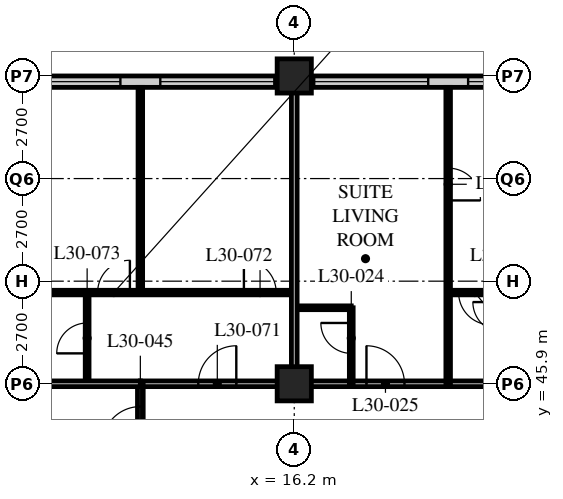
"""IFC4 building model, lengths in metres.
Left out: names, types, materials, properties, quantities, classifications, styles, units other than length and angle.
Written with IfcOpenShell. Run it as: python <this file> out.ifc"""

import sys

from ifc_helpers import new_model, si_unit, direction, frame, frame_2d, origin, origin_2d, place, context, subcontext, project, spatial, rectangle, hollow_rectangle, extrude, element, fill, save


model = new_model("IFC4")
c1 = context("Model", 3, precision=1e-05, world=origin(), true_north=direction((0.0, 1.0)))
c2 = subcontext(c1, "Body", "Model", "MODEL_VIEW")
j1 = project(units=[si_unit("LENGTHUNIT", "METRE"), si_unit("PLANEANGLEUNIT", "RADIAN")], contexts=[c1])
p1 = place(None, origin())
s1 = spatial("IfcSite", under=j1, at=p1, CompositionType="ELEMENT")
p2 = place(p1, origin())
s2 = spatial("IfcBuilding", under=s1, at=p2, CompositionType="ELEMENT")
p3 = place(p2, frame((0.0, 0.0, 120.4)))
s3 = spatial("IfcBuildingStorey", under=s2, at=p3, CompositionType="ELEMENT", Elevation=120.4)
for number, where, z_axis, x_axis in (
    (1, (16.2, 45.9, 0.0), (0.0, 0.0, 1.0), (1.0, 0.0, 0.0)),
    (2, (16.2, 54.0, 0.0), (0.0, 0.0, 1.0), (1.0, 0.0, 0.0)),
):
    element("IfcColumn", number, at=place(p3, frame(where, z_axis=z_axis, x_axis=x_axis)), inside=s3, PredefinedType="COLUMN", context=c2, shape_type="SweptSolid", body=[
        extrude(hollow_rectangle(XDim=0.9, YDim=0.9, WallThickness=0.09, at=origin_2d()), origin(), (0.0, 0.0, 1.0), 3.4),
    ])
p4 = place(p3, frame((48.3, 53.85, 0.0), z_axis=(0.0, 0.0, 1.0), x_axis=(-1.0, 0.0, 0.0)))
e3 = element("IfcWall", 3, at=p4, inside=s3, PredefinedType="SOLIDWALL", context=c2, shape_type="SweptSolid", body=[
    extrude(rectangle(XDim=40.2, YDim=0.3, at=frame_2d((20.1, 0.0))), origin(), (0.0, 0.0, 1.0), 3.19),
])
p5 = place(p4, frame((0.225, 0.0, 0.9)))
e4 = element("IfcOpeningElement", 4, at=p5, cuts=e3, PredefinedType="OPENING", context=c2, shape_type="SweptSolid", body=[
    extrude(rectangle(XDim=3.0, YDim=2.0, at=frame_2d((1.5, 1.0))), frame((0.0, 0.16, 0.0), z_axis=(0.0, -1.0, 0.0), x_axis=(1.0, 0.0, 0.0)), (0.0, 0.0, 1.0), 0.32),
])
p6 = place(p4, frame((4.275, 0.0, 0.9)))
e5 = element("IfcOpeningElement", 5, at=p6, cuts=e3, PredefinedType="OPENING", context=c2, shape_type="SweptSolid", body=[
    extrude(rectangle(XDim=3.0, YDim=2.0, at=frame_2d((1.5, 1.0))), frame((0.0, 0.16, 0.0), z_axis=(0.0, -1.0, 0.0), x_axis=(1.0, 0.0, 0.0)), (0.0, 0.0, 1.0), 0.32),
])
p7 = place(p4, frame((8.325, 0.0, 0.9)))
e6 = element("IfcOpeningElement", 6, at=p7, cuts=e3, PredefinedType="OPENING", context=c2, shape_type="SweptSolid", body=[
    extrude(rectangle(XDim=3.0, YDim=2.0, at=frame_2d((1.5, 1.0))), frame((0.0, 0.16, 0.0), z_axis=(0.0, -1.0, 0.0), x_axis=(1.0, 0.0, 0.0)), (0.0, 0.0, 1.0), 0.32),
])
p8 = place(p4, frame((12.375, 0.0, 0.9)))
e7 = element("IfcOpeningElement", 7, at=p8, cuts=e3, PredefinedType="OPENING", context=c2, shape_type="SweptSolid", body=[
    extrude(rectangle(XDim=3.0, YDim=2.0, at=frame_2d((1.5, 1.0))), frame((0.0, 0.16, 0.0), z_axis=(0.0, -1.0, 0.0), x_axis=(1.0, 0.0, 0.0)), (0.0, 0.0, 1.0), 0.32),
])
p9 = place(p4, frame((16.425, 0.0, 0.9)))
e8 = element("IfcOpeningElement", 8, at=p9, cuts=e3, PredefinedType="OPENING", context=c2, shape_type="SweptSolid", body=[
    extrude(rectangle(XDim=3.0, YDim=2.0, at=frame_2d((1.5, 1.0))), frame((0.0, 0.16, 0.0), z_axis=(0.0, -1.0, 0.0), x_axis=(1.0, 0.0, 0.0)), (0.0, 0.0, 1.0), 0.32),
])
p10 = place(p4, frame((20.475, 0.0, 0.9)))
e9 = element("IfcOpeningElement", 9, at=p10, cuts=e3, PredefinedType="OPENING", context=c2, shape_type="SweptSolid", body=[
    extrude(rectangle(XDim=3.0, YDim=2.0, at=frame_2d((1.5, 1.0))), frame((0.0, 0.16, 0.0), z_axis=(0.0, -1.0, 0.0), x_axis=(1.0, 0.0, 0.0)), (0.0, 0.0, 1.0), 0.32),
])
p11 = place(p4, frame((24.525, 0.0, 0.9)))
e10 = element("IfcOpeningElement", 10, at=p11, cuts=e3, PredefinedType="OPENING", context=c2, shape_type="SweptSolid", body=[
    extrude(rectangle(XDim=3.0, YDim=2.0, at=frame_2d((1.5, 1.0))), frame((0.0, 0.16, 0.0), z_axis=(0.0, -1.0, 0.0), x_axis=(1.0, 0.0, 0.0)), (0.0, 0.0, 1.0), 0.32),
])
p12 = place(p4, frame((28.575, 0.0, 0.9)))
e11 = element("IfcOpeningElement", 11, at=p12, cuts=e3, PredefinedType="OPENING", context=c2, shape_type="SweptSolid", body=[
    extrude(rectangle(XDim=3.0, YDim=2.0, at=frame_2d((1.5, 1.0))), frame((0.0, 0.16, 0.0), z_axis=(0.0, -1.0, 0.0), x_axis=(1.0, 0.0, 0.0)), (0.0, 0.0, 1.0), 0.32),
])
p13 = place(p4, frame((32.625, 0.0, 0.9)))
e12 = element("IfcOpeningElement", 12, at=p13, cuts=e3, PredefinedType="OPENING", context=c2, shape_type="SweptSolid", body=[
    extrude(rectangle(XDim=3.0, YDim=2.0, at=frame_2d((1.5, 1.0))), frame((0.0, 0.16, 0.0), z_axis=(0.0, -1.0, 0.0), x_axis=(1.0, 0.0, 0.0)), (0.0, 0.0, 1.0), 0.32),
])
p14 = place(p4, frame((36.675, 0.0, 0.9)))
e13 = element("IfcOpeningElement", 13, at=p14, cuts=e3, PredefinedType="OPENING", context=c2, shape_type="SweptSolid", body=[
    extrude(rectangle(XDim=3.0, YDim=2.0, at=frame_2d((1.5, 1.0))), frame((0.0, 0.16, 0.0), z_axis=(0.0, -1.0, 0.0), x_axis=(1.0, 0.0, 0.0)), (0.0, 0.0, 1.0), 0.32),
])
p15 = place(p3, frame((12.15, 45.9, 0.0), z_axis=(0.0, 0.0, 1.0), x_axis=(1.0, 0.0, 0.0)))
e14 = element("IfcWall", 14, at=p15, inside=s3, PredefinedType="PARTITIONING", context=c2, shape_type="SweptSolid", body=[
    extrude(rectangle(XDim=32.4, YDim=0.15, at=frame_2d((16.2, 0.0))), origin(), (0.0, 0.0, 1.0), 2.578),
])
p16 = place(p15, frame((5.95, 0.0, 0.0)))
e15 = element("IfcOpeningElement", 15, at=p16, cuts=e14, PredefinedType="OPENING", context=c2, shape_type="SweptSolid", body=[
    extrude(rectangle(XDim=1.0, YDim=2.1, at=frame_2d((0.5, 1.05))), frame((0.0, 0.085, 0.0), z_axis=(0.0, -1.0, 0.0), x_axis=(1.0, 0.0, 0.0)), (0.0, 0.0, 1.0), 0.17),
])
p17 = place(p15, frame((14.05, 0.0, 0.0)))
e16 = element("IfcOpeningElement", 16, at=p17, cuts=e14, PredefinedType="OPENING", context=c2, shape_type="SweptSolid", body=[
    extrude(rectangle(XDim=1.0, YDim=2.1, at=frame_2d((0.5, 1.05))), frame((0.0, 0.085, 0.0), z_axis=(0.0, -1.0, 0.0), x_axis=(1.0, 0.0, 0.0)), (0.0, 0.0, 1.0), 0.17),
])
p18 = place(p15, frame((25.7, 0.0, 0.0)))
e17 = element("IfcOpeningElement", 17, at=p18, cuts=e14, PredefinedType="OPENING", context=c2, shape_type="SweptSolid", body=[
    extrude(rectangle(XDim=1.0, YDim=2.1, at=frame_2d((0.5, 1.05))), frame((0.0, 0.085, 0.0), z_axis=(0.0, -1.0, 0.0), x_axis=(1.0, 0.0, 0.0)), (0.0, 0.0, 1.0), 0.17),
])
p19 = place(p15, frame((29.875, 0.0, 0.0)))
e18 = element("IfcOpeningElement", 18, at=p19, cuts=e14, PredefinedType="OPENING", context=c2, shape_type="SweptSolid", body=[
    extrude(rectangle(XDim=1.0, YDim=2.1, at=frame_2d((0.5, 1.05))), frame((0.0, 0.085, 0.0), z_axis=(0.0, -1.0, 0.0), x_axis=(1.0, 0.0, 0.0)), (0.0, 0.0, 1.0), 0.17),
])
p20 = place(p15, frame((1.525, 0.0, 0.0)))
e19 = element("IfcOpeningElement", 19, at=p20, cuts=e14, PredefinedType="OPENING", context=c2, shape_type="SweptSolid", body=[
    extrude(rectangle(XDim=1.0, YDim=2.1, at=frame_2d((0.5, 1.05))), frame((0.0, 0.085, 0.0), z_axis=(0.0, -1.0, 0.0), x_axis=(1.0, 0.0, 0.0)), (0.0, 0.0, 1.0), 0.17),
])
p21 = place(p3, frame((12.15, 17.55, 0.0), z_axis=(0.0, 0.0, 1.0), x_axis=(0.0, 1.0, 0.0)))
e20 = element("IfcWall", 20, at=p21, inside=s3, PredefinedType="PARTITIONING", context=c2, shape_type="SweptSolid", body=[
    extrude(rectangle(XDim=28.35, YDim=0.15, at=frame_2d((14.175, 0.0))), origin(), (0.0, 0.0, 1.0), 3.19),
])
p22 = place(p21, frame((5.45, 0.0, 0.0)))
e21 = element("IfcOpeningElement", 21, at=p22, cuts=e20, PredefinedType="OPENING", context=c2, shape_type="SweptSolid", body=[
    extrude(rectangle(XDim=1.0, YDim=2.1, at=frame_2d((0.5, 1.05))), frame((0.0, 0.085, 0.0), z_axis=(0.0, -1.0, 0.0), x_axis=(1.0, 0.0, 0.0)), (0.0, 0.0, 1.0), 0.17),
])
p23 = place(p21, frame((13.55, 0.0, 0.0)))
e22 = element("IfcOpeningElement", 22, at=p23, cuts=e20, PredefinedType="OPENING", context=c2, shape_type="SweptSolid", body=[
    extrude(rectangle(XDim=1.0, YDim=2.1, at=frame_2d((0.5, 1.05))), frame((0.0, 0.085, 0.0), z_axis=(0.0, -1.0, 0.0), x_axis=(1.0, 0.0, 0.0)), (0.0, 0.0, 1.0), 0.17),
])
p24 = place(p21, frame((21.65, 0.0, 0.0)))
e23 = element("IfcOpeningElement", 23, at=p24, cuts=e20, PredefinedType="OPENING", context=c2, shape_type="SweptSolid", body=[
    extrude(rectangle(XDim=1.0, YDim=2.1, at=frame_2d((0.5, 1.05))), frame((0.0, 0.085, 0.0), z_axis=(0.0, -1.0, 0.0), x_axis=(1.0, 0.0, 0.0)), (0.0, 0.0, 1.0), 0.17),
])
p25 = place(p21, frame((26.75, 0.0, 0.0)))
e24 = element("IfcOpeningElement", 24, at=p25, cuts=e20, PredefinedType="OPENING", context=c2, shape_type="SweptSolid", body=[
    extrude(rectangle(XDim=1.0, YDim=2.1, at=frame_2d((0.5, 1.05))), frame((0.0, 0.085, 0.0), z_axis=(0.0, -1.0, 0.0), x_axis=(1.0, 0.0, 0.0)), (0.0, 0.0, 1.0), 0.17),
])
p26 = place(p3, frame((16.2, 47.9, 0.0), z_axis=(0.0, 0.0, 1.0), x_axis=(1.0, 0.0, 0.0)))
e25 = element("IfcWall", 25, at=p26, inside=s3, PredefinedType="PARTITIONING", context=c2, shape_type="SweptSolid", body=[
    extrude(rectangle(XDim=1.5, YDim=0.1, at=frame_2d((0.75, 0.0))), origin(), (0.0, 0.0, 1.0), 3.19),
])
p27 = place(p3, frame((17.7, 45.9, 0.0), z_axis=(0.0, 0.0, 1.0), x_axis=(0.0, 1.0, 0.0)))
e26 = element("IfcWall", 26, at=p27, inside=s3, PredefinedType="PARTITIONING", context=c2, shape_type="SweptSolid", body=[
    extrude(rectangle(XDim=2.0, YDim=0.1, at=frame_2d((1.0, 0.0))), origin(), (0.0, 0.0, 1.0), 3.19),
])
p28 = place(p27, frame((0.8, 0.0, 0.0)))
e27 = element("IfcOpeningElement", 27, at=p28, cuts=e26, PredefinedType="OPENING", context=c2, shape_type="SweptSolid", body=[
    extrude(rectangle(XDim=0.8, YDim=2.1, at=frame_2d((0.4, 1.05))), frame((0.0, 0.06, 0.0), z_axis=(0.0, -1.0, 0.0), x_axis=(1.0, 0.0, 0.0)), (0.0, 0.0, 1.0), 0.12),
])
p29 = place(p3, frame((20.25, 45.9, 0.0), z_axis=(0.0, 0.0, 1.0), x_axis=(0.0, 1.0, 0.0)))
e28 = element("IfcWall", 28, at=p29, inside=s3, PredefinedType="PARTITIONING", context=c2, shape_type="SweptSolid", body=[
    extrude(rectangle(XDim=7.8, YDim=0.12, at=frame_2d((3.9, 0.0))), origin(), (0.0, 0.0, 1.0), 3.19),
])
p30 = place(p29, frame((4.825, 0.0, 0.0)))
e29 = element("IfcOpeningElement", 29, at=p30, cuts=e28, PredefinedType="OPENING", context=c2, shape_type="SweptSolid", body=[
    extrude(rectangle(XDim=0.85, YDim=2.1, at=frame_2d((0.425, 1.05))), frame((0.0, 0.07, 0.0), z_axis=(0.0, -1.0, 0.0), x_axis=(1.0, 0.0, 0.0)), (0.0, 0.0, 1.0), 0.14),
])
p31 = place(p3, frame((10.75, 45.9, 0.0), z_axis=(0.0, 0.0, 1.0), x_axis=(0.0, 1.0, 0.0)))
e30 = element("IfcWall", 30, at=p31, inside=s3, PredefinedType="PARTITIONING", context=c2, shape_type="SweptSolid", body=[
    extrude(rectangle(XDim=2.4, YDim=0.1, at=frame_2d((1.2, 0.0))), origin(), (0.0, 0.0, 1.0), 3.19),
])
p32 = place(p31, frame((0.8, 0.0, 0.0)))
e31 = element("IfcOpeningElement", 31, at=p32, cuts=e30, PredefinedType="OPENING", context=c2, shape_type="SweptSolid", body=[
    extrude(rectangle(XDim=0.8, YDim=2.1, at=frame_2d((0.4, 1.05))), frame((0.0, 0.06, 0.0), z_axis=(0.0, -1.0, 0.0), x_axis=(1.0, 0.0, 0.0)), (0.0, 0.0, 1.0), 0.12),
])
p33 = place(p3, frame((8.15, 48.3, 0.0), z_axis=(0.0, 0.0, 1.0), x_axis=(1.0, 0.0, 0.0)))
e32 = element("IfcWall", 32, at=p33, inside=s3, PredefinedType="PARTITIONING", context=c2, shape_type="SweptSolid", body=[
    extrude(rectangle(XDim=8.05, YDim=0.12, at=frame_2d((4.025, 0.0))), origin(), (0.0, 0.0, 1.0), 3.19),
])
p34 = place(p33, frame((6.725, 0.0, 0.0)))
e33 = element("IfcOpeningElement", 33, at=p34, cuts=e32, PredefinedType="OPENING", context=c2, shape_type="SweptSolid", body=[
    extrude(rectangle(XDim=0.85, YDim=2.1, at=frame_2d((0.425, 1.05))), frame((0.0, 0.07, 0.0), z_axis=(0.0, -1.0, 0.0), x_axis=(1.0, 0.0, 0.0)), (0.0, 0.0, 1.0), 0.14),
])
p35 = place(p33, frame((2.875, 0.0, 0.0)))
e34 = element("IfcOpeningElement", 34, at=p35, cuts=e32, PredefinedType="OPENING", context=c2, shape_type="SweptSolid", body=[
    extrude(rectangle(XDim=0.85, YDim=2.1, at=frame_2d((0.425, 1.05))), frame((0.0, 0.07, 0.0), z_axis=(0.0, -1.0, 0.0), x_axis=(1.0, 0.0, 0.0)), (0.0, 0.0, 1.0), 0.14),
])
p36 = place(p3, frame((12.15, 48.3, 0.0), z_axis=(0.0, 0.0, 1.0), x_axis=(0.0, 1.0, 0.0)))
e35 = element("IfcWall", 35, at=p36, inside=s3, PredefinedType="PARTITIONING", context=c2, shape_type="SweptSolid", body=[
    extrude(rectangle(XDim=5.4, YDim=0.12, at=frame_2d((2.7, 0.0))), origin(), (0.0, 0.0, 1.0), 3.19),
])
p37 = place(p3, frame((4.35, 45.9, 0.0), z_axis=(0.0, 0.0, 1.0), x_axis=(1.0, 0.0, 0.0)))
e36 = element("IfcWall", 36, at=p37, inside=s3, PredefinedType="PARTITIONING", context=c2, shape_type="SweptSolid", body=[
    extrude(rectangle(XDim=7.8, YDim=0.15, at=frame_2d((3.9, 0.0))), origin(), (0.0, 0.0, 1.0), 2.578),
])
p38 = place(p3, frame((16.2, 45.9, 0.0), z_axis=(0.0, 0.0, 1.0), x_axis=(0.0, 1.0, 0.0)))
e37 = element("IfcWall", 37, at=p38, inside=s3, PredefinedType="PARTITIONING", context=c2, shape_type="SweptSolid", body=[
    extrude(rectangle(XDim=7.8, YDim=0.15, at=frame_2d((3.9, 0.0))), origin(), (0.0, 0.0, 1.0), 2.578),
])
p39 = place(p3, frame((20.25, 48.3, 0.0), z_axis=(0.0, 0.0, 1.0), x_axis=(1.0, 0.0, 0.0)))
e38 = element("IfcWall", 38, at=p39, inside=s3, PredefinedType="PARTITIONING", context=c2, shape_type="SweptSolid", body=[
    extrude(rectangle(XDim=1.46, YDim=0.12, at=frame_2d((0.73, 0.0))), origin(), (0.0, 0.0, 1.0), 3.19),
])
p40 = place(p39, frame((0.275, 0.0, 0.0)))
e39 = element("IfcOpeningElement", 39, at=p40, cuts=e38, PredefinedType="OPENING", context=c2, shape_type="SweptSolid", body=[
    extrude(rectangle(XDim=0.85, YDim=2.1, at=frame_2d((0.425, 1.05))), frame((0.0, 0.07, 0.0), z_axis=(0.0, -1.0, 0.0), x_axis=(1.0, 0.0, 0.0)), (0.0, 0.0, 1.0), 0.14),
])
p41 = place(p11, origin())
e40 = element("IfcWindow", 40, at=p41, inside=s3, PartitioningType="SINGLE_PANEL", PredefinedType="WINDOW", context=c2, shape_type="SweptSolid", body=[
    extrude(rectangle(XDim=3.0, YDim=2.0, at=frame_2d((1.5, 1.0))), frame((0.0, 0.03, 0.0), z_axis=(0.0, -1.0, 0.0), x_axis=(1.0, 0.0, 0.0)), (0.0, 0.0, 1.0), 0.06),
])
fill(e10, e40)
p42 = place(p12, origin())
e41 = element("IfcWindow", 41, at=p42, inside=s3, PartitioningType="SINGLE_PANEL", PredefinedType="WINDOW", context=c2, shape_type="SweptSolid", body=[
    extrude(rectangle(XDim=3.0, YDim=2.0, at=frame_2d((1.5, 1.0))), frame((0.0, 0.03, 0.0), z_axis=(0.0, -1.0, 0.0), x_axis=(1.0, 0.0, 0.0)), (0.0, 0.0, 1.0), 0.06),
])
fill(e11, e41)
p43 = place(p13, origin())
e42 = element("IfcWindow", 42, at=p43, inside=s3, PartitioningType="SINGLE_PANEL", PredefinedType="WINDOW", context=c2, shape_type="SweptSolid", body=[
    extrude(rectangle(XDim=3.0, YDim=2.0, at=frame_2d((1.5, 1.0))), frame((0.0, 0.03, 0.0), z_axis=(0.0, -1.0, 0.0), x_axis=(1.0, 0.0, 0.0)), (0.0, 0.0, 1.0), 0.06),
])
fill(e12, e42)
p44 = place(p14, origin())
e43 = element("IfcWindow", 43, at=p44, inside=s3, PartitioningType="SINGLE_PANEL", PredefinedType="WINDOW", context=c2, shape_type="SweptSolid", body=[
    extrude(rectangle(XDim=3.0, YDim=2.0, at=frame_2d((1.5, 1.0))), frame((0.0, 0.03, 0.0), z_axis=(0.0, -1.0, 0.0), x_axis=(1.0, 0.0, 0.0)), (0.0, 0.0, 1.0), 0.06),
])
fill(e13, e43)
p45 = place(p28, origin())
e44 = element("IfcDoor", 44, at=p45, inside=s3, OperationType="SINGLE_SWING_RIGHT", PredefinedType="DOOR", context=c2, shape_type="SweptSolid", body=[
    extrude(rectangle(XDim=0.8, YDim=2.1, at=frame_2d((0.4, 1.05))), frame((0.0, 0.025, 0.0), z_axis=(0.0, -1.0, 0.0), x_axis=(1.0, 0.0, 0.0)), (0.0, 0.0, 1.0), 0.05),
])
fill(e27, e44)
p46 = place(p16, origin())
e45 = element("IfcDoor", 45, at=p46, inside=s3, OperationType="SINGLE_SWING_LEFT", PredefinedType="DOOR", context=c2, shape_type="SweptSolid", body=[
    extrude(rectangle(XDim=1.0, YDim=2.1, at=frame_2d((0.5, 1.05))), frame((0.0, 0.025, 0.0), z_axis=(0.0, -1.0, 0.0), x_axis=(1.0, 0.0, 0.0)), (0.0, 0.0, 1.0), 0.05),
])
fill(e15, e45)
p47 = place(p30, origin())
e46 = element("IfcDoor", 46, at=p47, inside=s3, OperationType="SINGLE_SWING_RIGHT", PredefinedType="DOOR", context=c2, shape_type="SweptSolid", body=[
    extrude(rectangle(XDim=0.85, YDim=2.1, at=frame_2d((0.425, 1.05))), frame((0.0, 0.025, 0.0), z_axis=(0.0, -1.0, 0.0), x_axis=(1.0, 0.0, 0.0)), (0.0, 0.0, 1.0), 0.05),
])
fill(e29, e46)
p48 = place(p25, origin())
e47 = element("IfcDoor", 47, at=p48, inside=s3, OperationType="SINGLE_SWING_LEFT", PredefinedType="DOOR", context=c2, shape_type="SweptSolid", body=[
    extrude(rectangle(XDim=1.0, YDim=2.1, at=frame_2d((0.5, 1.05))), frame((0.0, 0.025, 0.0), z_axis=(0.0, -1.0, 0.0), x_axis=(1.0, 0.0, 0.0)), (0.0, 0.0, 1.0), 0.05),
])
fill(e24, e47)
p49 = place(p20, origin())
e48 = element("IfcDoor", 48, at=p49, inside=s3, OperationType="SINGLE_SWING_RIGHT", PredefinedType="DOOR", context=c2, shape_type="SweptSolid", body=[
    extrude(rectangle(XDim=1.0, YDim=2.1, at=frame_2d((0.5, 1.05))), frame((0.0, 0.025, 0.0), z_axis=(0.0, -1.0, 0.0), x_axis=(1.0, 0.0, 0.0)), (0.0, 0.0, 1.0), 0.05),
])
fill(e19, e48)
p50 = place(p34, origin())
e49 = element("IfcDoor", 49, at=p50, inside=s3, OperationType="SINGLE_SWING_LEFT", PredefinedType="DOOR", context=c2, shape_type="SweptSolid", body=[
    extrude(rectangle(XDim=0.85, YDim=2.1, at=frame_2d((0.425, 1.05))), frame((0.0, 0.025, 0.0), z_axis=(0.0, -1.0, 0.0), x_axis=(1.0, 0.0, 0.0)), (0.0, 0.0, 1.0), 0.05),
])
fill(e33, e49)
p51 = place(p32, origin())
e50 = element("IfcDoor", 50, at=p51, inside=s3, OperationType="SINGLE_SWING_LEFT", PredefinedType="DOOR", context=c2, shape_type="SweptSolid", body=[
    extrude(rectangle(XDim=0.8, YDim=2.1, at=frame_2d((0.4, 1.05))), frame((0.0, 0.025, 0.0), z_axis=(0.0, -1.0, 0.0), x_axis=(1.0, 0.0, 0.0)), (0.0, 0.0, 1.0), 0.05),
])
fill(e31, e50)
p52 = place(p35, origin())
e51 = element("IfcDoor", 51, at=p52, inside=s3, OperationType="SINGLE_SWING_RIGHT", PredefinedType="DOOR", context=c2, shape_type="SweptSolid", body=[
    extrude(rectangle(XDim=0.85, YDim=2.1, at=frame_2d((0.425, 1.05))), frame((0.0, 0.025, 0.0), z_axis=(0.0, -1.0, 0.0), x_axis=(1.0, 0.0, 0.0)), (0.0, 0.0, 1.0), 0.05),
])
fill(e34, e51)
p53 = place(p40, origin())
e52 = element("IfcDoor", 52, at=p53, inside=s3, OperationType="SINGLE_SWING_LEFT", PredefinedType="DOOR", context=c2, shape_type="SweptSolid", body=[
    extrude(rectangle(XDim=0.85, YDim=2.1, at=frame_2d((0.425, 1.05))), frame((0.0, 0.025, 0.0), z_axis=(0.0, -1.0, 0.0), x_axis=(1.0, 0.0, 0.0)), (0.0, 0.0, 1.0), 0.05),
])
fill(e39, e52)
save(model, sys.argv[1])
